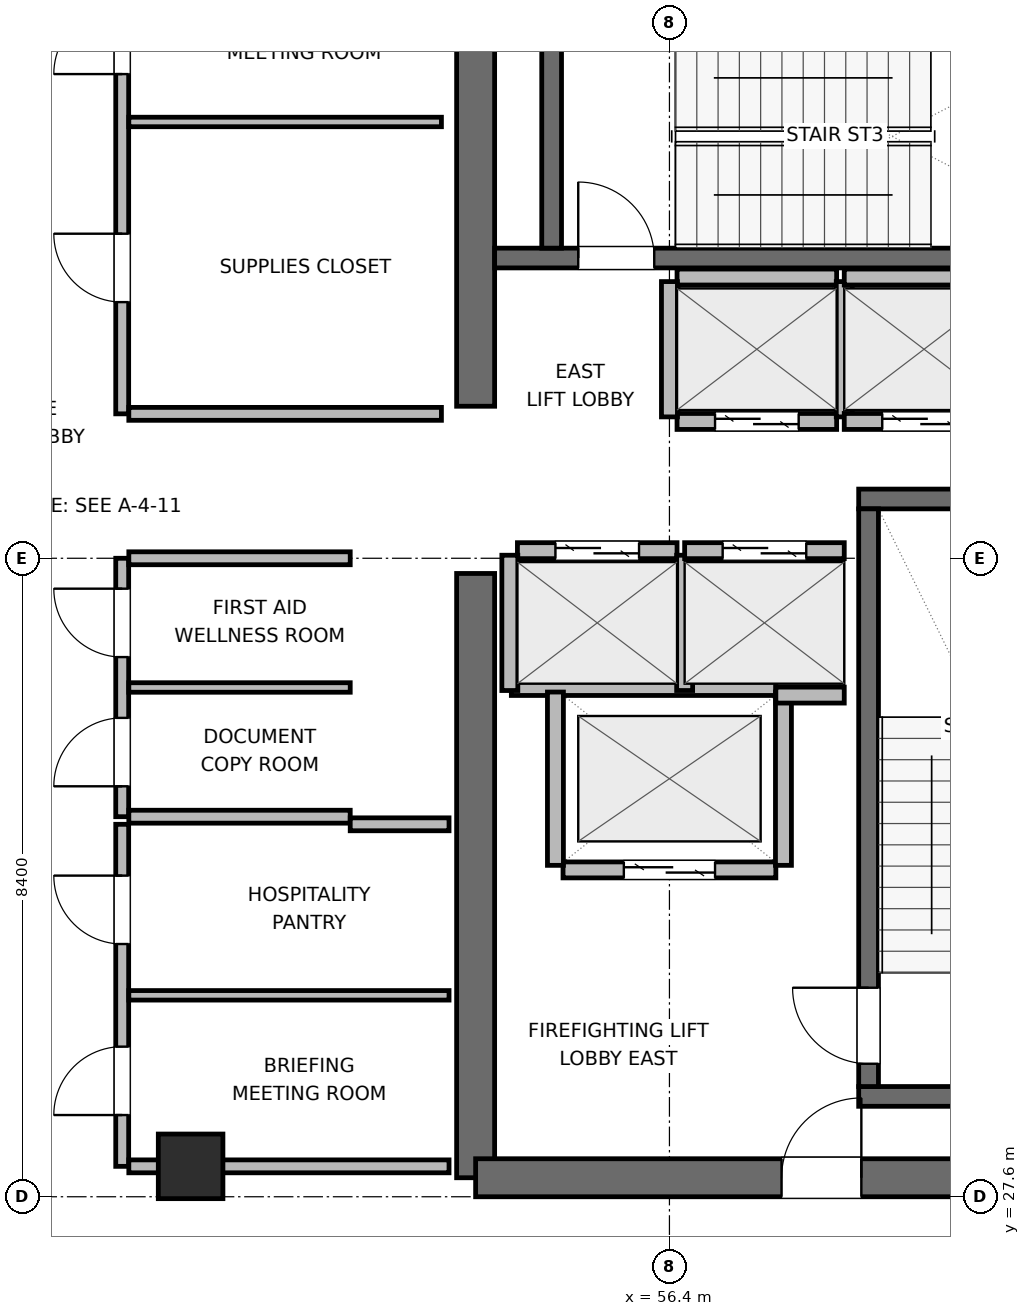
"""IFC4 building model, lengths in metres.
Left out: names, types, materials, properties, quantities, classifications, styles, units other than length and angle.
Written with IfcOpenShell. Run it as: python <this file> out.ifc"""

import sys

from ifc_helpers import new_model, si_unit, direction, frame, frame_2d, origin, origin_2d, place, context, subcontext, project, spatial, rectangle, extrude, element, fill, save


model = new_model("IFC4")
c1 = context("Model", 3, precision=1e-05, world=origin(), true_north=direction((0.0, 1.0)))
c2 = subcontext(c1, "Body", "Model", "MODEL_VIEW")
j1 = project(units=[si_unit("LENGTHUNIT", "METRE"), si_unit("PLANEANGLEUNIT", "RADIAN")], contexts=[c1])
p1 = place(None, origin())
s1 = spatial("IfcSite", under=j1, at=p1, CompositionType="ELEMENT")
p2 = place(p1, origin())
s2 = spatial("IfcBuilding", under=s1, at=p2, CompositionType="ELEMENT")
p3 = place(p2, frame((0.0, 0.0, 337.5)))
s3 = spatial("IfcBuildingStorey", under=s2, at=p3, CompositionType="ELEMENT", Elevation=337.5)
p4 = place(p3, frame((53.85, 27.85, 0.0), z_axis=(0.0, 0.0, 1.0), x_axis=(0.0, 1.0, 0.0)))
e1 = element("IfcWall", 1, at=p4, inside=s3, PredefinedType="SHEAR", context=c2, shape_type="SweptSolid", body=[
    extrude(rectangle(XDim=7.95, YDim=0.5, at=frame_2d((3.975, 0.0))), origin(), (0.0, 0.0, 1.0), 4.5),
])
p5 = place(p3, frame((53.85, 38.0, 0.0), z_axis=(0.0, 0.0, 1.0), x_axis=(0.0, 1.0, 0.0)))
e2 = element("IfcWall", 2, at=p5, inside=s3, PredefinedType="SHEAR", context=c2, shape_type="SweptSolid", body=[
    extrude(rectangle(XDim=6.15, YDim=0.5, at=frame_2d((3.075, 0.0))), origin(), (0.0, 0.0, 1.0), 4.5),
])
p6 = place(p3, frame((53.85, 27.85, 0.0), z_axis=(0.0, 0.0, 1.0), x_axis=(1.0, 0.0, 0.0)))
e3 = element("IfcWall", 3, at=p6, inside=s3, PredefinedType="SHEAR", context=c2, shape_type="SweptSolid", body=[
    extrude(rectangle(XDim=9.5, YDim=0.5, at=frame_2d((4.75, 0.0))), origin(), (0.0, 0.0, 1.0), 4.5),
])
p7 = place(p6, frame((4.025, 0.0, 0.0)))
e4 = element("IfcOpeningElement", 4, at=p7, cuts=e3, PredefinedType="OPENING", context=c2, shape_type="SweptSolid", body=[
    extrude(rectangle(XDim=1.05, YDim=2.04, at=frame_2d((0.525, 1.02))), frame((0.0, 0.26, 0.0), z_axis=(0.0, -1.0, 0.0), x_axis=(1.0, 0.0, 0.0)), (0.0, 0.0, 1.0), 0.52),
])
for number, where, z_axis, x_axis in (
    (5, (58.89, 28.92, 0.0), (0.0, 0.0, 1.0), (1.0, 0.0, 0.0)),
    (6, (58.89, 36.78, 0.0), (0.0, 0.0, 1.0), (1.0, 0.0, 0.0)),
):
    element("IfcWall", number, at=place(p3, frame(where, z_axis=z_axis, x_axis=x_axis)), inside=s3, PredefinedType="SHEAR", context=c2, shape_type="SweptSolid", body=[
        extrude(rectangle(XDim=4.21, YDim=0.26, at=frame_2d((2.105, 0.0))), origin(), (0.0, 0.0, 1.0), 4.5),
    ])
p8 = place(p3, frame((59.02, 29.05, 0.0), z_axis=(0.0, 0.0, 1.0), x_axis=(0.0, 1.0, 0.0)))
e7 = element("IfcWall", 7, at=p8, inside=s3, PredefinedType="SHEAR", context=c2, shape_type="SweptSolid", body=[
    extrude(rectangle(XDim=7.6, YDim=0.26, at=frame_2d((3.8, 0.0))), origin(), (0.0, 0.0, 1.0), 4.5),
])
p9 = place(p8, frame((0.3, 0.0, 0.0)))
e8 = element("IfcOpeningElement", 8, at=p9, cuts=e7, PredefinedType="OPENING", context=c2, shape_type="SweptSolid", body=[
    extrude(rectangle(XDim=1.0, YDim=2.04, at=frame_2d((0.5, 1.02))), frame((0.0, 0.14, 0.0), z_axis=(0.0, -1.0, 0.0), x_axis=(1.0, 0.0, 0.0)), (0.0, 0.0, 1.0), 0.28),
])
p10 = place(p3, frame((54.1, 39.95, 0.0), z_axis=(0.0, 0.0, 1.0), x_axis=(1.0, 0.0, 0.0)))
e9 = element("IfcWall", 9, at=p10, inside=s3, PredefinedType="SHEAR", context=c2, shape_type="SweptSolid", body=[
    extrude(rectangle(XDim=9.0, YDim=0.26, at=frame_2d((4.5, 0.0))), origin(), (0.0, 0.0, 1.0), 4.5),
])
p11 = place(p10, frame((1.1, 0.0, 0.0)))
e10 = element("IfcOpeningElement", 10, at=p11, cuts=e9, PredefinedType="OPENING", context=c2, shape_type="SweptSolid", body=[
    extrude(rectangle(XDim=1.0, YDim=2.04, at=frame_2d((0.5, 1.02))), frame((0.0, 0.14, 0.0), z_axis=(0.0, -1.0, 0.0), x_axis=(1.0, 0.0, 0.0)), (0.0, 0.0, 1.0), 0.28),
])
p12 = place(p3, frame((54.85, 40.08, 0.0), z_axis=(0.0, 0.0, 1.0), x_axis=(0.0, 1.0, 0.0)))
e11 = element("IfcWall", 11, at=p12, inside=s3, PredefinedType="SHEAR", context=c2, shape_type="SweptSolid", body=[
    extrude(rectangle(XDim=2.94, YDim=0.26, at=frame_2d((1.47, 0.0))), origin(), (0.0, 0.0, 1.0), 4.5),
])
p13 = place(p3, frame((50.1, 28.0, 0.0), z_axis=(0.0, 0.0, 1.0), x_axis=(1.0, 0.0, 0.0)))
e12 = element("IfcColumn", 12, at=p13, inside=s3, PredefinedType="COLUMN", context=c2, shape_type="SweptSolid", body=[
    extrude(rectangle(XDim=0.85, YDim=0.85, at=origin_2d()), origin(), (0.0, 0.0, 1.0), 4.5),
])
p14 = place(p3, frame((55.0, 31.9, 0.0), z_axis=(0.0, 0.0, 1.0), x_axis=(1.0, 0.0, 0.0)))
e13 = element("IfcWall", 13, at=p14, inside=s3, PredefinedType="PARTITIONING", context=c2, shape_type="SweptSolid", body=[
    extrude(rectangle(XDim=2.8, YDim=0.21, at=frame_2d((1.4, 0.0))), origin(), (0.0, 0.0, 1.0), 4.28),
])
p15 = place(p14, frame((0.8, 0.0, 0.0)))
e14 = element("IfcOpeningElement", 14, at=p15, cuts=e13, PredefinedType="OPENING", context=c2, shape_type="SweptSolid", body=[
    extrude(rectangle(XDim=1.2, YDim=2.04, at=frame_2d((0.6, 1.02))), frame((0.0, 0.115, 0.0), z_axis=(0.0, -1.0, 0.0), x_axis=(1.0, 0.0, 0.0)), (0.0, 0.0, 1.0), 0.23),
])
p16 = place(p3, frame((54.32, 34.3, 0.0), z_axis=(0.0, 0.0, 1.0), x_axis=(1.0, 0.0, 0.0)))
e15 = element("IfcWall", 15, at=p16, inside=s3, PredefinedType="PARTITIONING", context=c2, shape_type="SweptSolid", body=[
    extrude(rectangle(XDim=3.48, YDim=0.21, at=frame_2d((1.74, 0.0))), origin(), (0.0, 0.0, 1.0), 4.28),
])
for number, where, z_axis, x_axis in (
    (16, (54.9, 31.96, 0.0), (0.0, 0.0, 1.0), (0.0, 1.0, 0.0)),
    (17, (57.9, 31.96, 0.0), (0.0, 0.0, 1.0), (0.0, 1.0, 0.0)),
):
    element("IfcWall", number, at=place(p3, frame(where, z_axis=z_axis, x_axis=x_axis)), inside=s3, PredefinedType="PARTITIONING", context=c2, shape_type="SweptSolid", body=[
        extrude(rectangle(XDim=2.28, YDim=0.21, at=frame_2d((1.14, 0.0))), origin(), (0.0, 0.0, 1.0), 4.28),
    ])
p17 = place(p3, frame((54.4, 36.1, 0.0), z_axis=(0.0, 0.0, 1.0), x_axis=(1.0, 0.0, 0.0)))
e18 = element("IfcWall", 18, at=p17, inside=s3, PredefinedType="PARTITIONING", context=c2, shape_type="SweptSolid", body=[
    extrude(rectangle(XDim=2.1, YDim=0.21, at=frame_2d((1.05, 0.0))), origin(), (0.0, 0.0, 1.0), 4.28),
])
p18 = place(p17, frame((0.5, 0.0, 0.0)))
e19 = element("IfcOpeningElement", 19, at=p18, cuts=e18, PredefinedType="OPENING", context=c2, shape_type="SweptSolid", body=[
    extrude(rectangle(XDim=1.1, YDim=2.04, at=frame_2d((0.55, 1.02))), frame((0.0, 0.115, 0.0), z_axis=(0.0, -1.0, 0.0), x_axis=(1.0, 0.0, 0.0)), (0.0, 0.0, 1.0), 0.23),
])
for number, where, z_axis, x_axis in (
    (20, (54.3, 34.26, 0.0), (0.0, 0.0, 1.0), (0.0, 1.0, 0.0)),
    (21, (56.6, 34.26, 0.0), (0.0, 0.0, 1.0), (0.0, 1.0, 0.0)),
):
    element("IfcWall", number, at=place(p3, frame(where, z_axis=z_axis, x_axis=x_axis)), inside=s3, PredefinedType="PARTITIONING", context=c2, shape_type="SweptSolid", body=[
        extrude(rectangle(XDim=1.78, YDim=0.21, at=frame_2d((0.89, 0.0))), origin(), (0.0, 0.0, 1.0), 4.28),
    ])
p19 = place(p3, frame((56.6, 36.1, 0.0), z_axis=(0.0, 0.0, 1.0), x_axis=(1.0, 0.0, 0.0)))
e22 = element("IfcWall", 22, at=p19, inside=s3, PredefinedType="PARTITIONING", context=c2, shape_type="SweptSolid", body=[
    extrude(rectangle(XDim=2.1, YDim=0.21, at=frame_2d((1.05, 0.0))), origin(), (0.0, 0.0, 1.0), 4.28),
])
p20 = place(p19, frame((0.5, 0.0, 0.0)))
e23 = element("IfcOpeningElement", 23, at=p20, cuts=e22, PredefinedType="OPENING", context=c2, shape_type="SweptSolid", body=[
    extrude(rectangle(XDim=1.1, YDim=2.04, at=frame_2d((0.55, 1.02))), frame((0.0, 0.115, 0.0), z_axis=(0.0, -1.0, 0.0), x_axis=(1.0, 0.0, 0.0)), (0.0, 0.0, 1.0), 0.23),
])
p21 = place(p3, frame((57.8, 34.2, 0.0), z_axis=(0.0, 0.0, 1.0), x_axis=(1.0, 0.0, 0.0)))
e24 = element("IfcWall", 24, at=p21, inside=s3, PredefinedType="PARTITIONING", context=c2, shape_type="SweptSolid", body=[
    extrude(rectangle(XDim=0.9, YDim=0.21, at=frame_2d((0.45, 0.0))), origin(), (0.0, 0.0, 1.0), 4.28),
])
p22 = place(p3, frame((56.5, 37.8, 0.0), z_axis=(0.0, 0.0, 1.0), x_axis=(1.0, 0.0, 0.0)))
e25 = element("IfcWall", 25, at=p22, inside=s3, PredefinedType="PARTITIONING", context=c2, shape_type="SweptSolid", body=[
    extrude(rectangle(XDim=2.1, YDim=0.21, at=frame_2d((1.05, 0.0))), origin(), (0.0, 0.0, 1.0), 4.28),
])
p23 = place(p22, frame((0.5, 0.0, 0.0)))
e26 = element("IfcOpeningElement", 26, at=p23, cuts=e25, PredefinedType="OPENING", context=c2, shape_type="SweptSolid", body=[
    extrude(rectangle(XDim=1.1, YDim=2.04, at=frame_2d((0.55, 1.02))), frame((0.0, 0.115, 0.0), z_axis=(0.0, -1.0, 0.0), x_axis=(1.0, 0.0, 0.0)), (0.0, 0.0, 1.0), 0.23),
])
p24 = place(p3, frame((56.5, 39.7, 0.0), z_axis=(0.0, 0.0, 1.0), x_axis=(1.0, 0.0, 0.0)))
e27 = element("IfcWall", 27, at=p24, inside=s3, PredefinedType="PARTITIONING", context=c2, shape_type="SweptSolid", body=[
    extrude(rectangle(XDim=2.1, YDim=0.21, at=frame_2d((1.05, 0.0))), origin(), (0.0, 0.0, 1.0), 4.28),
])
for number, where, z_axis, x_axis in (
    (28, (56.4, 37.86, 0.0), (0.0, 0.0, 1.0), (0.0, 1.0, 0.0)),
    (29, (58.7, 37.86, 0.0), (0.0, 0.0, 1.0), (0.0, 1.0, 0.0)),
):
    element("IfcWall", number, at=place(p3, frame(where, z_axis=z_axis, x_axis=x_axis)), inside=s3, PredefinedType="PARTITIONING", context=c2, shape_type="SweptSolid", body=[
        extrude(rectangle(XDim=1.78, YDim=0.21, at=frame_2d((0.89, 0.0))), origin(), (0.0, 0.0, 1.0), 4.28),
    ])
p25 = place(p3, frame((58.7, 37.8, 0.0), z_axis=(0.0, 0.0, 1.0), x_axis=(1.0, 0.0, 0.0)))
e30 = element("IfcWall", 30, at=p25, inside=s3, PredefinedType="PARTITIONING", context=c2, shape_type="SweptSolid", body=[
    extrude(rectangle(XDim=2.1, YDim=0.21, at=frame_2d((1.05, 0.0))), origin(), (0.0, 0.0, 1.0), 4.28),
])
p26 = place(p25, frame((0.5, 0.0, 0.0)))
e31 = element("IfcOpeningElement", 31, at=p26, cuts=e30, PredefinedType="OPENING", context=c2, shape_type="SweptSolid", body=[
    extrude(rectangle(XDim=1.1, YDim=2.04, at=frame_2d((0.55, 1.02))), frame((0.0, 0.115, 0.0), z_axis=(0.0, -1.0, 0.0), x_axis=(1.0, 0.0, 0.0)), (0.0, 0.0, 1.0), 0.23),
])
p27 = place(p3, frame((58.7, 39.7, 0.0), z_axis=(0.0, 0.0, 1.0), x_axis=(1.0, 0.0, 0.0)))
e32 = element("IfcWall", 32, at=p27, inside=s3, PredefinedType="PARTITIONING", context=c2, shape_type="SweptSolid", body=[
    extrude(rectangle(XDim=2.1, YDim=0.21, at=frame_2d((1.05, 0.0))), origin(), (0.0, 0.0, 1.0), 4.28),
])
p28 = place(p3, frame((49.2, 32.6, 0.0), z_axis=(0.0, 0.0, 1.0), x_axis=(0.0, 1.0, 0.0)))
e33 = element("IfcWall", 33, at=p28, inside=s3, PredefinedType="PARTITIONING", context=c2, shape_type="SweptSolid", body=[
    extrude(rectangle(XDim=3.4, YDim=0.17, at=frame_2d((1.7, 0.0))), origin(), (0.0, 0.0, 1.0), 4.28),
])
p29 = place(p28, frame((0.4, 0.0, 0.0)))
e34 = element("IfcOpeningElement", 34, at=p29, cuts=e33, PredefinedType="OPENING", context=c2, shape_type="SweptSolid", body=[
    extrude(rectangle(XDim=0.9, YDim=2.02, at=frame_2d((0.45, 1.01))), frame((0.0, 0.095, 0.0), z_axis=(0.0, -1.0, 0.0), x_axis=(1.0, 0.0, 0.0)), (0.0, 0.0, 1.0), 0.19),
])
p30 = place(p28, frame((2.1, 0.0, 0.0)))
e35 = element("IfcOpeningElement", 35, at=p30, cuts=e33, PredefinedType="OPENING", context=c2, shape_type="SweptSolid", body=[
    extrude(rectangle(XDim=0.9, YDim=2.02, at=frame_2d((0.45, 1.01))), frame((0.0, 0.095, 0.0), z_axis=(0.0, -1.0, 0.0), x_axis=(1.0, 0.0, 0.0)), (0.0, 0.0, 1.0), 0.19),
])
for number, where, z_axis, x_axis in (
    (36, (49.287, 32.6, 0.0), (0.0, 0.0, 1.0), (1.0, 0.0, 0.0)),
    (37, (49.287, 36.0, 0.0), (0.0, 0.0, 1.0), (1.0, 0.0, 0.0)),
):
    element("IfcWall", number, at=place(p3, frame(where, z_axis=z_axis, x_axis=x_axis)), inside=s3, PredefinedType="PARTITIONING", context=c2, shape_type="SweptSolid", body=[
        extrude(rectangle(XDim=2.913, YDim=0.17, at=frame_2d((1.457, 0.0))), origin(), (0.0, 0.0, 1.0), 4.28),
    ])
p31 = place(p3, frame((49.287, 34.3, 0.0), z_axis=(0.0, 0.0, 1.0), x_axis=(1.0, 0.0, 0.0)))
e38 = element("IfcWall", 38, at=p31, inside=s3, PredefinedType="PARTITIONING", context=c2, shape_type="SweptSolid", body=[
    extrude(rectangle(XDim=2.913, YDim=0.125, at=frame_2d((1.457, 0.0))), origin(), (0.0, 0.0, 1.0), 4.28),
])
p32 = place(p3, frame((49.2, 28.0, 0.0), z_axis=(0.0, 0.0, 1.0), x_axis=(0.0, 1.0, 0.0)))
e39 = element("IfcWall", 39, at=p32, inside=s3, PredefinedType="PARTITIONING", context=c2, shape_type="SweptSolid", body=[
    extrude(rectangle(XDim=4.5, YDim=0.17, at=frame_2d((2.25, 0.0))), origin(), (0.0, 0.0, 1.0), 4.28),
])
p33 = place(p32, frame((0.675, 0.0, 0.0)))
e40 = element("IfcOpeningElement", 40, at=p33, cuts=e39, PredefinedType="OPENING", context=c2, shape_type="SweptSolid", body=[
    extrude(rectangle(XDim=0.9, YDim=2.02, at=frame_2d((0.45, 1.01))), frame((0.0, 0.095, 0.0), z_axis=(0.0, -1.0, 0.0), x_axis=(1.0, 0.0, 0.0)), (0.0, 0.0, 1.0), 0.19),
])
p34 = place(p32, frame((2.925, 0.0, 0.0)))
e41 = element("IfcOpeningElement", 41, at=p34, cuts=e39, PredefinedType="OPENING", context=c2, shape_type="SweptSolid", body=[
    extrude(rectangle(XDim=0.9, YDim=2.02, at=frame_2d((0.45, 1.01))), frame((0.0, 0.095, 0.0), z_axis=(0.0, -1.0, 0.0), x_axis=(1.0, 0.0, 0.0)), (0.0, 0.0, 1.0), 0.19),
])
p35 = place(p3, frame((49.287, 28.0, 0.0), z_axis=(0.0, 0.0, 1.0), x_axis=(1.0, 0.0, 0.0)))
e42 = element("IfcWall", 42, at=p35, inside=s3, PredefinedType="PARTITIONING", context=c2, shape_type="SweptSolid", body=[
    extrude(rectangle(XDim=4.213, YDim=0.17, at=frame_2d((2.106, 0.0))), origin(), (0.0, 0.0, 1.0), 3.365),
])
p36 = place(p3, frame((52.2, 32.5, 0.0), z_axis=(0.0, 0.0, 1.0), x_axis=(1.0, 0.0, 0.0)))
e43 = element("IfcWall", 43, at=p36, inside=s3, PredefinedType="PARTITIONING", context=c2, shape_type="SweptSolid", body=[
    extrude(rectangle(XDim=1.3, YDim=0.17, at=frame_2d((0.65, 0.0))), origin(), (0.0, 0.0, 1.0), 4.28),
])
p37 = place(p3, frame((49.287, 30.25, 0.0), z_axis=(0.0, 0.0, 1.0), x_axis=(1.0, 0.0, 0.0)))
e44 = element("IfcWall", 44, at=p37, inside=s3, PredefinedType="PARTITIONING", context=c2, shape_type="SweptSolid", body=[
    extrude(rectangle(XDim=4.213, YDim=0.125, at=frame_2d((2.106, 0.0))), origin(), (0.0, 0.0, 1.0), 4.28),
])
p38 = place(p3, frame((49.2, 37.9, 0.0), z_axis=(0.0, 0.0, 1.0), x_axis=(0.0, 1.0, 0.0)))
e45 = element("IfcWall", 45, at=p38, inside=s3, PredefinedType="PARTITIONING", context=c2, shape_type="SweptSolid", body=[
    extrude(rectangle(XDim=6.0, YDim=0.17, at=frame_2d((3.0, 0.0))), origin(), (0.0, 0.0, 1.0), 4.28),
])
p39 = place(p38, frame((1.47, 0.0, 0.0)))
e46 = element("IfcOpeningElement", 46, at=p39, cuts=e45, PredefinedType="OPENING", context=c2, shape_type="SweptSolid", body=[
    extrude(rectangle(XDim=0.9, YDim=2.02, at=frame_2d((0.45, 1.01))), frame((0.0, 0.095, 0.0), z_axis=(0.0, -1.0, 0.0), x_axis=(1.0, 0.0, 0.0)), (0.0, 0.0, 1.0), 0.19),
])
p40 = place(p38, frame((4.47, 0.0, 0.0)))
e47 = element("IfcOpeningElement", 47, at=p40, cuts=e45, PredefinedType="OPENING", context=c2, shape_type="SweptSolid", body=[
    extrude(rectangle(XDim=0.9, YDim=2.02, at=frame_2d((0.45, 1.01))), frame((0.0, 0.095, 0.0), z_axis=(0.0, -1.0, 0.0), x_axis=(1.0, 0.0, 0.0)), (0.0, 0.0, 1.0), 0.19),
])
p41 = place(p3, frame((49.287, 37.9, 0.0), z_axis=(0.0, 0.0, 1.0), x_axis=(1.0, 0.0, 0.0)))
e48 = element("IfcWall", 48, at=p41, inside=s3, PredefinedType="PARTITIONING", context=c2, shape_type="SweptSolid", body=[
    extrude(rectangle(XDim=4.113, YDim=0.17, at=frame_2d((2.056, 0.0))), origin(), (0.0, 0.0, 1.0), 4.28),
])
p42 = place(p3, frame((49.287, 41.74, 0.0), z_axis=(0.0, 0.0, 1.0), x_axis=(1.0, 0.0, 0.0)))
e49 = element("IfcWall", 49, at=p42, inside=s3, PredefinedType="PARTITIONING", context=c2, shape_type="SweptSolid", body=[
    extrude(rectangle(XDim=4.113, YDim=0.125, at=frame_2d((2.056, 0.0))), origin(), (0.0, 0.0, 1.0), 4.28),
])
p43 = place(p9, origin())
e50 = element("IfcDoor", 50, at=p43, inside=s3, OperationType="SINGLE_SWING_RIGHT", PredefinedType="DOOR", context=c2, shape_type="SweptSolid", body=[
    extrude(rectangle(XDim=1.0, YDim=2.04, at=frame_2d((0.5, 1.02))), frame((0.0, 0.025, 0.0), z_axis=(0.0, -1.0, 0.0), x_axis=(1.0, 0.0, 0.0)), (0.0, 0.0, 1.0), 0.05),
])
fill(e8, e50)
p44 = place(p11, origin())
e51 = element("IfcDoor", 51, at=p44, inside=s3, OperationType="SINGLE_SWING_LEFT", PredefinedType="DOOR", context=c2, shape_type="SweptSolid", body=[
    extrude(rectangle(XDim=1.0, YDim=2.04, at=frame_2d((0.5, 1.02))), frame((0.0, 0.025, 0.0), z_axis=(0.0, -1.0, 0.0), x_axis=(1.0, 0.0, 0.0)), (0.0, 0.0, 1.0), 0.05),
])
fill(e10, e51)
p45 = place(p15, origin())
e52 = element("IfcDoor", 52, at=p45, inside=s3, OperationType="DOUBLE_DOOR_SLIDING", PredefinedType="DOOR", context=c2, shape_type="SweptSolid", body=[
    extrude(rectangle(XDim=1.2, YDim=2.04, at=frame_2d((0.6, 1.02))), frame((0.0, 0.025, 0.0), z_axis=(0.0, -1.0, 0.0), x_axis=(1.0, 0.0, 0.0)), (0.0, 0.0, 1.0), 0.05),
])
fill(e14, e52)
p46 = place(p18, origin())
e53 = element("IfcDoor", 53, at=p46, inside=s3, OperationType="DOUBLE_DOOR_SLIDING", PredefinedType="DOOR", context=c2, shape_type="SweptSolid", body=[
    extrude(rectangle(XDim=1.1, YDim=2.04, at=frame_2d((0.55, 1.02))), frame((0.0, 0.025, 0.0), z_axis=(0.0, -1.0, 0.0), x_axis=(1.0, 0.0, 0.0)), (0.0, 0.0, 1.0), 0.05),
])
fill(e19, e53)
p47 = place(p20, origin())
e54 = element("IfcDoor", 54, at=p47, inside=s3, OperationType="DOUBLE_DOOR_SLIDING", PredefinedType="DOOR", context=c2, shape_type="SweptSolid", body=[
    extrude(rectangle(XDim=1.1, YDim=2.04, at=frame_2d((0.55, 1.02))), frame((0.0, 0.025, 0.0), z_axis=(0.0, -1.0, 0.0), x_axis=(1.0, 0.0, 0.0)), (0.0, 0.0, 1.0), 0.05),
])
fill(e23, e54)
p48 = place(p23, origin())
e55 = element("IfcDoor", 55, at=p48, inside=s3, OperationType="DOUBLE_DOOR_SLIDING", PredefinedType="DOOR", context=c2, shape_type="SweptSolid", body=[
    extrude(rectangle(XDim=1.1, YDim=2.04, at=frame_2d((0.55, 1.02))), frame((0.0, 0.025, 0.0), z_axis=(0.0, -1.0, 0.0), x_axis=(1.0, 0.0, 0.0)), (0.0, 0.0, 1.0), 0.05),
])
fill(e26, e55)
p49 = place(p26, origin())
e56 = element("IfcDoor", 56, at=p49, inside=s3, OperationType="DOUBLE_DOOR_SLIDING", PredefinedType="DOOR", context=c2, shape_type="SweptSolid", body=[
    extrude(rectangle(XDim=1.1, YDim=2.04, at=frame_2d((0.55, 1.02))), frame((0.0, 0.025, 0.0), z_axis=(0.0, -1.0, 0.0), x_axis=(1.0, 0.0, 0.0)), (0.0, 0.0, 1.0), 0.05),
])
fill(e31, e56)
p50 = place(p7, origin())
e57 = element("IfcDoor", 57, at=p50, inside=s3, OperationType="SINGLE_SWING_RIGHT", PredefinedType="DOOR", context=c2, shape_type="SweptSolid", body=[
    extrude(rectangle(XDim=1.05, YDim=2.04, at=frame_2d((0.525, 1.02))), frame((0.0, 0.025, 0.0), z_axis=(0.0, -1.0, 0.0), x_axis=(1.0, 0.0, 0.0)), (0.0, 0.0, 1.0), 0.05),
])
fill(e4, e57)
p51 = place(p29, origin())
e58 = element("IfcDoor", 58, at=p51, inside=s3, OperationType="SINGLE_SWING_LEFT", PredefinedType="DOOR", context=c2, shape_type="SweptSolid", body=[
    extrude(rectangle(XDim=0.9, YDim=2.02, at=frame_2d((0.45, 1.01))), frame((0.0, 0.025, 0.0), z_axis=(0.0, -1.0, 0.0), x_axis=(1.0, 0.0, 0.0)), (0.0, 0.0, 1.0), 0.05),
])
fill(e34, e58)
p52 = place(p30, origin())
e59 = element("IfcDoor", 59, at=p52, inside=s3, OperationType="SINGLE_SWING_RIGHT", PredefinedType="DOOR", context=c2, shape_type="SweptSolid", body=[
    extrude(rectangle(XDim=0.9, YDim=2.02, at=frame_2d((0.45, 1.01))), frame((0.0, 0.025, 0.0), z_axis=(0.0, -1.0, 0.0), x_axis=(1.0, 0.0, 0.0)), (0.0, 0.0, 1.0), 0.05),
])
fill(e35, e59)
p53 = place(p33, origin())
e60 = element("IfcDoor", 60, at=p53, inside=s3, OperationType="SINGLE_SWING_LEFT", PredefinedType="DOOR", context=c2, shape_type="SweptSolid", body=[
    extrude(rectangle(XDim=0.9, YDim=2.02, at=frame_2d((0.45, 1.01))), frame((0.0, 0.025, 0.0), z_axis=(0.0, -1.0, 0.0), x_axis=(1.0, 0.0, 0.0)), (0.0, 0.0, 1.0), 0.05),
])
fill(e40, e60)
p54 = place(p34, origin())
e61 = element("IfcDoor", 61, at=p54, inside=s3, OperationType="SINGLE_SWING_RIGHT", PredefinedType="DOOR", context=c2, shape_type="SweptSolid", body=[
    extrude(rectangle(XDim=0.9, YDim=2.02, at=frame_2d((0.45, 1.01))), frame((0.0, 0.025, 0.0), z_axis=(0.0, -1.0, 0.0), x_axis=(1.0, 0.0, 0.0)), (0.0, 0.0, 1.0), 0.05),
])
fill(e41, e61)
p55 = place(p39, origin())
e62 = element("IfcDoor", 62, at=p55, inside=s3, OperationType="SINGLE_SWING_RIGHT", PredefinedType="DOOR", context=c2, shape_type="SweptSolid", body=[
    extrude(rectangle(XDim=0.9, YDim=2.02, at=frame_2d((0.45, 1.01))), frame((0.0, 0.025, 0.0), z_axis=(0.0, -1.0, 0.0), x_axis=(1.0, 0.0, 0.0)), (0.0, 0.0, 1.0), 0.05),
])
fill(e46, e62)
p56 = place(p40, origin())
e63 = element("IfcDoor", 63, at=p56, inside=s3, OperationType="SINGLE_SWING_LEFT", PredefinedType="DOOR", context=c2, shape_type="SweptSolid", body=[
    extrude(rectangle(XDim=0.9, YDim=2.02, at=frame_2d((0.45, 1.01))), frame((0.0, 0.025, 0.0), z_axis=(0.0, -1.0, 0.0), x_axis=(1.0, 0.0, 0.0)), (0.0, 0.0, 1.0), 0.05),
])
fill(e47, e63)
save(model, sys.argv[1])
